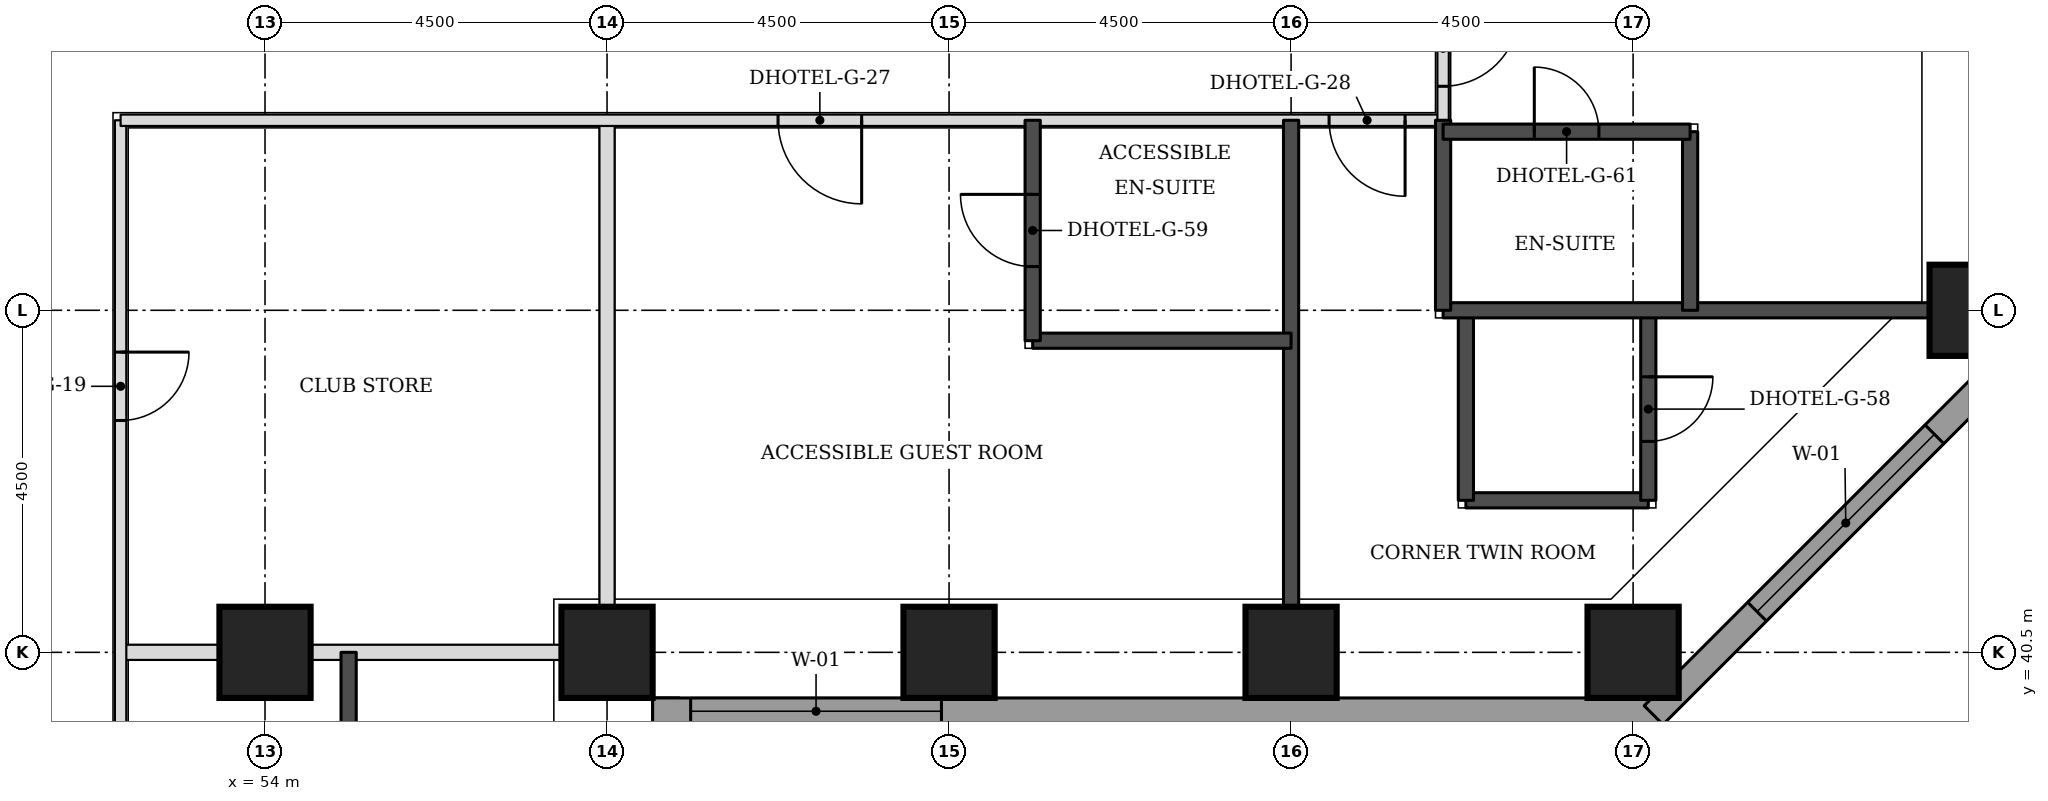
"""IFC4 building model, lengths in metres.
Left out: names, types, materials, properties, quantities, classifications, styles, units other than length and angle.
Written with IfcOpenShell. Run it as: python <this file> out.ifc"""

import sys

from ifc_helpers import new_model, si_unit, direction, frame, frame_2d, origin, origin_2d, place, context, subcontext, project, spatial, rectangle, extrude, element, fill, save


model = new_model("IFC4")
c1 = context("Model", 3, precision=1e-05, world=origin(), true_north=direction((0.0, 1.0)))
c2 = subcontext(c1, "Body", "Model", "MODEL_VIEW")
j1 = project(units=[si_unit("LENGTHUNIT", "METRE"), si_unit("PLANEANGLEUNIT", "RADIAN")], contexts=[c1])
p1 = place(None, origin())
s1 = spatial("IfcSite", under=j1, at=p1, CompositionType="ELEMENT")
p2 = place(p1, origin())
s2 = spatial("IfcBuilding", under=s1, at=p2, CompositionType="ELEMENT")
p3 = place(p2, frame((0.0, 0.0, 66.0)))
s3 = spatial("IfcBuildingStorey", under=s2, at=p3, CompositionType="ELEMENT", Elevation=66.0)
for number, where, z_axis, x_axis in (
    (1, (54.0, 40.5, 0.0), (0.0, 0.0, 1.0), (1.0, 0.0, 0.0)),
    (2, (58.5, 40.5, 0.0), (0.0, 0.0, 1.0), (1.0, 0.0, 0.0)),
    (3, (63.0, 40.5, 0.0), (0.0, 0.0, 1.0), (1.0, 0.0, 0.0)),
    (4, (67.5, 40.5, 0.0), (0.0, 0.0, 1.0), (1.0, 0.0, 0.0)),
    (5, (72.0, 40.5, 0.0), (0.0, 0.0, 1.0), (1.0, 0.0, 0.0)),
    (6, (76.5, 45.0, 0.0), (0.0, 0.0, 1.0), (1.0, 0.0, 0.0)),
):
    element("IfcColumn", number, at=place(p3, frame(where, z_axis=z_axis, x_axis=x_axis)), inside=s3, PredefinedType="COLUMN", context=c2, shape_type="SweptSolid", body=[
        extrude(rectangle(XDim=1.2, YDim=1.2, at=origin_2d()), origin(), (0.0, 0.0, 1.0), 3.3),
    ])
p4 = place(p3, frame((59.275, 22.106, 0.0), z_axis=(0.0, 0.0, 1.0), x_axis=(0.0, 1.0, 0.0)))
e7 = element("IfcWall", 7, at=p4, inside=s3, PredefinedType="STANDARD", context=c2, shape_type="SweptSolid", body=[
    extrude(rectangle(XDim=17.793, YDim=0.35, at=frame_2d((8.897, 0.0))), origin(), (0.0, 0.0, 1.0), 3.055),
])
p5 = place(p4, frame((5.493, 0.0, 0.8)))
e8 = element("IfcOpeningElement", 8, at=p5, cuts=e7, PredefinedType="OPENING", context=c2, shape_type="SweptSolid", body=[
    extrude(rectangle(XDim=3.3, YDim=1.5, at=frame_2d((1.65, 0.75))), frame((0.0, 0.185, 0.0), z_axis=(0.0, -1.0, 0.0), x_axis=(1.0, 0.0, 0.0)), (0.0, 0.0, 1.0), 0.37),
])
p6 = place(p4, frame((13.993, 0.0, 0.8)))
e9 = element("IfcOpeningElement", 9, at=p6, cuts=e7, PredefinedType="OPENING", context=c2, shape_type="SweptSolid", body=[
    extrude(rectangle(XDim=3.3, YDim=1.5, at=frame_2d((1.65, 0.75))), frame((0.0, 0.185, 0.0), z_axis=(0.0, -1.0, 0.0), x_axis=(1.0, 0.0, 0.0)), (0.0, 0.0, 1.0), 0.37),
])
p7 = place(p3, frame((59.1, 39.725, 0.0), z_axis=(0.0, 0.0, 1.0), x_axis=(1.0, 0.0, 0.0)))
e10 = element("IfcWall", 10, at=p7, inside=s3, PredefinedType="STANDARD", context=c2, shape_type="SweptSolid", body=[
    extrude(rectangle(XDim=13.293, YDim=0.35, at=frame_2d((6.647, 0.0))), origin(), (0.0, 0.0, 1.0), 3.055),
])
p8 = place(p7, frame((0.5, 0.0, 0.8)))
e11 = element("IfcOpeningElement", 11, at=p8, cuts=e10, PredefinedType="OPENING", context=c2, shape_type="SweptSolid", body=[
    extrude(rectangle(XDim=3.3, YDim=1.5, at=frame_2d((1.65, 0.75))), frame((0.0, 0.185, 0.0), z_axis=(0.0, -1.0, 0.0), x_axis=(1.0, 0.0, 0.0)), (0.0, 0.0, 1.0), 0.37),
])
p9 = place(p3, frame((72.27, 39.674, 0.0), z_axis=(0.0, 0.0, 1.0), x_axis=(0.707106781187, 0.707106781187, 0.0)))
e12 = element("IfcWall", 12, at=p9, inside=s3, PredefinedType="STANDARD", context=c2, shape_type="SweptSolid", body=[
    extrude(rectangle(XDim=7.151, YDim=0.35, at=frame_2d((3.576, 0.0))), origin(), (0.0, 0.0, 1.0), 3.055),
])
p10 = place(p9, frame((1.926, 0.0, 0.8)))
e13 = element("IfcOpeningElement", 13, at=p10, cuts=e12, PredefinedType="OPENING", context=c2, shape_type="SweptSolid", body=[
    extrude(rectangle(XDim=3.3, YDim=1.5, at=frame_2d((1.65, 0.75))), frame((0.0, 0.185, 0.0), z_axis=(0.0, -1.0, 0.0), x_axis=(1.0, 0.0, 0.0)), (0.0, 0.0, 1.0), 0.37),
])
p11 = place(p3, frame((52.1, 40.5, 0.0), z_axis=(0.0, 0.0, 1.0), x_axis=(1.0, 0.0, 0.0)))
e14 = element("IfcWall", 14, at=p11, inside=s3, PredefinedType="PARTITIONING", context=c2, shape_type="SweptSolid", body=[
    extrude(rectangle(XDim=5.8, YDim=0.2, at=frame_2d((2.9, 0.0))), origin(), (0.0, 0.0, 1.0), 2.33),
])
p12 = place(p3, frame((58.5, 41.1, 0.0), z_axis=(0.0, 0.0, 1.0), x_axis=(0.0, 1.0, 0.0)))
e15 = element("IfcWall", 15, at=p12, inside=s3, PredefinedType="PARTITIONING", context=c2, shape_type="SweptSolid", body=[
    extrude(rectangle(XDim=6.4, YDim=0.2, at=frame_2d((3.2, 0.0))), origin(), (0.0, 0.0, 1.0), 3.08),
])
p13 = place(p3, frame((52.1, 24.4, 0.0), z_axis=(0.0, 0.0, 1.0), x_axis=(0.0, 1.0, 0.0)))
e16 = element("IfcWall", 16, at=p13, inside=s3, PredefinedType="PARTITIONING", context=c2, shape_type="SweptSolid", body=[
    extrude(rectangle(XDim=23.1, YDim=0.15, at=frame_2d((11.55, 0.0))), origin(), (0.0, 0.0, 1.0), 3.08),
])
p14 = place(p13, frame((1.025, 0.0, 0.0)))
e17 = element("IfcOpeningElement", 17, at=p14, cuts=e16, PredefinedType="OPENING", context=c2, shape_type="SweptSolid", body=[
    extrude(rectangle(XDim=1.0, YDim=2.1, at=frame_2d((0.5, 1.05))), frame((0.0, 0.085, 0.0), z_axis=(0.0, -1.0, 0.0), x_axis=(1.0, 0.0, 0.0)), (0.0, 0.0, 1.0), 0.17),
])
p15 = place(p13, frame((3.425, 0.0, 0.0)))
e18 = element("IfcOpeningElement", 18, at=p15, cuts=e16, PredefinedType="OPENING", context=c2, shape_type="SweptSolid", body=[
    extrude(rectangle(XDim=1.0, YDim=2.1, at=frame_2d((0.5, 1.05))), frame((0.0, 0.085, 0.0), z_axis=(0.0, -1.0, 0.0), x_axis=(1.0, 0.0, 0.0)), (0.0, 0.0, 1.0), 0.17),
])
p16 = place(p13, frame((10.025, 0.0, 0.0)))
e19 = element("IfcOpeningElement", 19, at=p16, cuts=e16, PredefinedType="OPENING", context=c2, shape_type="SweptSolid", body=[
    extrude(rectangle(XDim=1.0, YDim=2.1, at=frame_2d((0.5, 1.05))), frame((0.0, 0.085, 0.0), z_axis=(0.0, -1.0, 0.0), x_axis=(1.0, 0.0, 0.0)), (0.0, 0.0, 1.0), 0.17),
])
p17 = place(p13, frame((12.425, 0.0, 0.0)))
e20 = element("IfcOpeningElement", 20, at=p17, cuts=e16, PredefinedType="OPENING", context=c2, shape_type="SweptSolid", body=[
    extrude(rectangle(XDim=1.0, YDim=2.1, at=frame_2d((0.5, 1.05))), frame((0.0, 0.085, 0.0), z_axis=(0.0, -1.0, 0.0), x_axis=(1.0, 0.0, 0.0)), (0.0, 0.0, 1.0), 0.17),
])
p18 = place(p13, frame((19.15, 0.0, 0.0)))
e21 = element("IfcOpeningElement", 21, at=p18, cuts=e16, PredefinedType="OPENING", context=c2, shape_type="SweptSolid", body=[
    extrude(rectangle(XDim=0.9, YDim=2.1, at=frame_2d((0.45, 1.05))), frame((0.0, 0.085, 0.0), z_axis=(0.0, -1.0, 0.0), x_axis=(1.0, 0.0, 0.0)), (0.0, 0.0, 1.0), 0.17),
])
p19 = place(p3, frame((52.1, 47.5, 0.0), z_axis=(0.0, 0.0, 1.0), x_axis=(1.0, 0.0, 0.0)))
e22 = element("IfcWall", 22, at=p19, inside=s3, PredefinedType="PARTITIONING", context=c2, shape_type="SweptSolid", body=[
    extrude(rectangle(XDim=17.4, YDim=0.15, at=frame_2d((8.7, 0.0))), origin(), (0.0, 0.0, 1.0), 3.08),
])
p20 = place(p19, frame((8.65, 0.0, 0.0)))
e23 = element("IfcOpeningElement", 23, at=p20, cuts=e22, PredefinedType="OPENING", context=c2, shape_type="SweptSolid", body=[
    extrude(rectangle(XDim=1.1, YDim=2.1, at=frame_2d((0.55, 1.05))), frame((0.0, 0.085, 0.0), z_axis=(0.0, -1.0, 0.0), x_axis=(1.0, 0.0, 0.0)), (0.0, 0.0, 1.0), 0.17),
])
p21 = place(p19, frame((15.9, 0.0, 0.0)))
e24 = element("IfcOpeningElement", 24, at=p21, cuts=e22, PredefinedType="OPENING", context=c2, shape_type="SweptSolid", body=[
    extrude(rectangle(XDim=1.0, YDim=2.1, at=frame_2d((0.5, 1.05))), frame((0.0, 0.085, 0.0), z_axis=(0.0, -1.0, 0.0), x_axis=(1.0, 0.0, 0.0)), (0.0, 0.0, 1.0), 0.17),
])
p22 = place(p3, frame((69.5, 47.5, 0.0), z_axis=(0.0, 0.0, 1.0), x_axis=(0.0, 1.0, 0.0)))
e25 = element("IfcWall", 25, at=p22, inside=s3, PredefinedType="PARTITIONING", context=c2, shape_type="SweptSolid", body=[
    extrude(rectangle(XDim=26.5, YDim=0.15, at=frame_2d((13.25, 0.0))), origin(), (0.0, 0.0, 1.0), 3.08),
])
p23 = place(p22, frame((25.053, 0.0, 0.0)))
e26 = element("IfcOpeningElement", 26, at=p23, cuts=e25, PredefinedType="OPENING", context=c2, shape_type="SweptSolid", body=[
    extrude(rectangle(XDim=1.0, YDim=2.1, at=frame_2d((0.5, 1.05))), frame((0.0, 0.085, 0.0), z_axis=(0.0, -1.0, 0.0), x_axis=(1.0, 0.0, 0.0)), (0.0, 0.0, 1.0), 0.17),
])
p24 = place(p22, frame((22.925, 0.0, 0.0)))
e27 = element("IfcOpeningElement", 27, at=p24, cuts=e25, PredefinedType="OPENING", context=c2, shape_type="SweptSolid", body=[
    extrude(rectangle(XDim=1.0, YDim=2.1, at=frame_2d((0.5, 1.05))), frame((0.0, 0.085, 0.0), z_axis=(0.0, -1.0, 0.0), x_axis=(1.0, 0.0, 0.0)), (0.0, 0.0, 1.0), 0.17),
])
p25 = place(p22, frame((16.325, 0.0, 0.0)))
e28 = element("IfcOpeningElement", 28, at=p25, cuts=e25, PredefinedType="OPENING", context=c2, shape_type="SweptSolid", body=[
    extrude(rectangle(XDim=1.0, YDim=2.1, at=frame_2d((0.5, 1.05))), frame((0.0, 0.085, 0.0), z_axis=(0.0, -1.0, 0.0), x_axis=(1.0, 0.0, 0.0)), (0.0, 0.0, 1.0), 0.17),
])
p26 = place(p22, frame((13.925, 0.0, 0.0)))
e29 = element("IfcOpeningElement", 29, at=p26, cuts=e25, PredefinedType="OPENING", context=c2, shape_type="SweptSolid", body=[
    extrude(rectangle(XDim=1.0, YDim=2.1, at=frame_2d((0.5, 1.05))), frame((0.0, 0.085, 0.0), z_axis=(0.0, -1.0, 0.0), x_axis=(1.0, 0.0, 0.0)), (0.0, 0.0, 1.0), 0.17),
])
p27 = place(p22, frame((4.25, 0.0, 0.0)))
e30 = element("IfcOpeningElement", 30, at=p27, cuts=e25, PredefinedType="OPENING", context=c2, shape_type="SweptSolid", body=[
    extrude(rectangle(XDim=1.1, YDim=2.1, at=frame_2d((0.55, 1.05))), frame((0.0, 0.085, 0.0), z_axis=(0.0, -1.0, 0.0), x_axis=(1.0, 0.0, 0.0)), (0.0, 0.0, 1.0), 0.17),
])
p28 = place(p22, frame((0.447, 0.0, 0.0)))
e31 = element("IfcOpeningElement", 31, at=p28, cuts=e25, PredefinedType="OPENING", context=c2, shape_type="SweptSolid", body=[
    extrude(rectangle(XDim=1.0, YDim=2.1, at=frame_2d((0.5, 1.05))), frame((0.0, 0.085, 0.0), z_axis=(0.0, -1.0, 0.0), x_axis=(1.0, 0.0, 0.0)), (0.0, 0.0, 1.0), 0.17),
])
p29 = place(p3, frame((55.1, 38.65, 0.0), z_axis=(0.0, 0.0, 1.0), x_axis=(0.0, 1.0, 0.0)))
e32 = element("IfcWall", 32, at=p29, inside=s3, PredefinedType="SOLIDWALL", context=c2, shape_type="SweptSolid", body=[
    extrude(rectangle(XDim=1.85, YDim=0.2, at=frame_2d((0.925, 0.0))), origin(), (0.0, 0.0, 1.0), 3.08),
])
p30 = place(p3, frame((67.5, 41.1, 0.0), z_axis=(0.0, 0.0, 1.0), x_axis=(0.0, 1.0, 0.0)))
e33 = element("IfcWall", 33, at=p30, inside=s3, PredefinedType="SOLIDWALL", context=c2, shape_type="SweptSolid", body=[
    extrude(rectangle(XDim=6.4, YDim=0.2, at=frame_2d((3.2, 0.0))), origin(), (0.0, 0.0, 1.0), 3.08),
])
p31 = place(p3, frame((69.8, 42.5, 0.0), z_axis=(0.0, 0.0, 1.0), x_axis=(1.0, 0.0, 0.0)))
e34 = element("IfcWall", 34, at=p31, inside=s3, PredefinedType="SOLIDWALL", context=c2, shape_type="SweptSolid", body=[
    extrude(rectangle(XDim=2.4, YDim=0.2, at=frame_2d((1.2, 0.0))), origin(), (0.0, 0.0, 1.0), 3.08),
])
p32 = place(p3, frame((69.8, 42.5, 0.0), z_axis=(0.0, 0.0, 1.0), x_axis=(0.0, 1.0, 0.0)))
e35 = element("IfcWall", 35, at=p32, inside=s3, PredefinedType="SOLIDWALL", context=c2, shape_type="SweptSolid", body=[
    extrude(rectangle(XDim=2.5, YDim=0.2, at=frame_2d((1.25, 0.0))), origin(), (0.0, 0.0, 1.0), 3.08),
])
p33 = place(p3, frame((72.2, 42.5, 0.0), z_axis=(0.0, 0.0, 1.0), x_axis=(0.0, 1.0, 0.0)))
e36 = element("IfcWall", 36, at=p33, inside=s3, PredefinedType="SOLIDWALL", context=c2, shape_type="SweptSolid", body=[
    extrude(rectangle(XDim=2.5, YDim=0.2, at=frame_2d((1.25, 0.0))), origin(), (0.0, 0.0, 1.0), 3.08),
])
p34 = place(p33, frame((0.775, 0.0, 0.0)))
e37 = element("IfcOpeningElement", 37, at=p34, cuts=e36, PredefinedType="OPENING", context=c2, shape_type="SweptSolid", body=[
    extrude(rectangle(XDim=0.85, YDim=2.1, at=frame_2d((0.425, 1.05))), frame((0.0, 0.11, 0.0), z_axis=(0.0, -1.0, 0.0), x_axis=(1.0, 0.0, 0.0)), (0.0, 0.0, 1.0), 0.22),
])
p35 = place(p3, frame((64.1, 44.6, 0.0), z_axis=(0.0, 0.0, 1.0), x_axis=(1.0, 0.0, 0.0)))
e38 = element("IfcWall", 38, at=p35, inside=s3, PredefinedType="SOLIDWALL", context=c2, shape_type="SweptSolid", body=[
    extrude(rectangle(XDim=3.4, YDim=0.2, at=frame_2d((1.7, 0.0))), origin(), (0.0, 0.0, 1.0), 3.08),
])
p36 = place(p3, frame((64.1, 44.6, 0.0), z_axis=(0.0, 0.0, 1.0), x_axis=(0.0, 1.0, 0.0)))
e39 = element("IfcWall", 39, at=p36, inside=s3, PredefinedType="SOLIDWALL", context=c2, shape_type="SweptSolid", body=[
    extrude(rectangle(XDim=2.9, YDim=0.2, at=frame_2d((1.45, 0.0))), origin(), (0.0, 0.0, 1.0), 3.08),
])
p37 = place(p36, frame((0.975, 0.0, 0.0)))
e40 = element("IfcOpeningElement", 40, at=p37, cuts=e39, PredefinedType="OPENING", context=c2, shape_type="SweptSolid", body=[
    extrude(rectangle(XDim=0.95, YDim=2.1, at=frame_2d((0.475, 1.05))), frame((0.0, 0.11, 0.0), z_axis=(0.0, -1.0, 0.0), x_axis=(1.0, 0.0, 0.0)), (0.0, 0.0, 1.0), 0.22),
])
p38 = place(p3, frame((69.5, 45.0, 0.0), z_axis=(0.0, 0.0, 1.0), x_axis=(1.0, 0.0, 0.0)))
e41 = element("IfcWall", 41, at=p38, inside=s3, PredefinedType="SOLIDWALL", context=c2, shape_type="SweptSolid", body=[
    extrude(rectangle(XDim=6.4, YDim=0.2, at=frame_2d((3.2, 0.0))), origin(), (0.0, 0.0, 1.0), 3.08),
])
p39 = place(p3, frame((69.5, 45.0, 0.0), z_axis=(0.0, 0.0, 1.0), x_axis=(0.0, 1.0, 0.0)))
e42 = element("IfcWall", 42, at=p39, inside=s3, PredefinedType="SOLIDWALL", context=c2, shape_type="SweptSolid", body=[
    extrude(rectangle(XDim=2.5, YDim=0.2, at=frame_2d((1.25, 0.0))), origin(), (0.0, 0.0, 1.0), 3.08),
])
p40 = place(p3, frame((72.75, 45.0, 0.0), z_axis=(0.0, 0.0, 1.0), x_axis=(0.0, 1.0, 0.0)))
e43 = element("IfcWall", 43, at=p40, inside=s3, PredefinedType="SOLIDWALL", context=c2, shape_type="SweptSolid", body=[
    extrude(rectangle(XDim=2.35, YDim=0.2, at=frame_2d((1.175, 0.0))), origin(), (0.0, 0.0, 1.0), 3.08),
])
p41 = place(p3, frame((69.5, 47.35, 0.0), z_axis=(0.0, 0.0, 1.0), x_axis=(1.0, 0.0, 0.0)))
e44 = element("IfcWall", 44, at=p41, inside=s3, PredefinedType="SOLIDWALL", context=c2, shape_type="SweptSolid", body=[
    extrude(rectangle(XDim=3.25, YDim=0.2, at=frame_2d((1.625, 0.0))), origin(), (0.0, 0.0, 1.0), 3.08),
])
p42 = place(p41, frame((1.2, 0.0, 0.0)))
e45 = element("IfcOpeningElement", 45, at=p42, cuts=e44, PredefinedType="OPENING", context=c2, shape_type="SweptSolid", body=[
    extrude(rectangle(XDim=0.85, YDim=2.1, at=frame_2d((0.425, 1.05))), frame((0.0, 0.11, 0.0), z_axis=(0.0, -1.0, 0.0), x_axis=(1.0, 0.0, 0.0)), (0.0, 0.0, 1.0), 0.22),
])
p43 = place(p8, origin())
e46 = element("IfcWindow", 46, at=p43, inside=s3, PartitioningType="SINGLE_PANEL", PredefinedType="WINDOW", context=c2, shape_type="SweptSolid", body=[
    extrude(rectangle(XDim=3.3, YDim=1.5, at=frame_2d((1.65, 0.75))), frame((0.0, 0.085, 0.0), z_axis=(0.0, -1.0, 0.0), x_axis=(1.0, 0.0, 0.0)), (0.0, 0.0, 1.0), 0.06),
])
fill(e11, e46)
p44 = place(p10, origin())
e47 = element("IfcWindow", 47, at=p44, inside=s3, PartitioningType="SINGLE_PANEL", PredefinedType="WINDOW", context=c2, shape_type="SweptSolid", body=[
    extrude(rectangle(XDim=3.3, YDim=1.5, at=frame_2d((1.65, 0.75))), frame((0.0, 0.085, 0.0), z_axis=(0.0, -1.0, 0.0), x_axis=(1.0, 0.0, 0.0)), (0.0, 0.0, 1.0), 0.06),
])
fill(e13, e47)
p45 = place(p28, frame((1.0, 0.0, 0.0), z_axis=(0.0, 0.0, 1.0), x_axis=(-1.0, 0.0, 0.0)))
e48 = element("IfcDoor", 48, at=p45, inside=s3, OperationType="SINGLE_SWING_LEFT", PredefinedType="DOOR", context=c2, shape_type="SweptSolid", body=[
    extrude(rectangle(XDim=1.0, YDim=2.1, at=frame_2d((0.5, 1.05))), frame((0.0, 0.025, 0.0), z_axis=(0.0, -1.0, 0.0), x_axis=(1.0, 0.0, 0.0)), (0.0, 0.0, 1.0), 0.05),
])
fill(e31, e48)
p46 = place(p42, origin())
e49 = element("IfcDoor", 49, at=p46, inside=s3, OperationType="SINGLE_SWING_LEFT", PredefinedType="DOOR", context=c2, shape_type="SweptSolid", body=[
    extrude(rectangle(XDim=0.85, YDim=2.1, at=frame_2d((0.425, 1.05))), frame((0.0, 0.025, 0.0), z_axis=(0.0, -1.0, 0.0), x_axis=(1.0, 0.0, 0.0)), (0.0, 0.0, 1.0), 0.05),
])
fill(e45, e49)
p47 = place(p20, frame((1.1, 0.0, 0.0), z_axis=(0.0, 0.0, 1.0), x_axis=(-1.0, 0.0, 0.0)))
e50 = element("IfcDoor", 50, at=p47, inside=s3, OperationType="SINGLE_SWING_LEFT", PredefinedType="DOOR", context=c2, shape_type="SweptSolid", body=[
    extrude(rectangle(XDim=1.1, YDim=2.1, at=frame_2d((0.55, 1.05))), frame((0.0, 0.025, 0.0), z_axis=(0.0, -1.0, 0.0), x_axis=(1.0, 0.0, 0.0)), (0.0, 0.0, 1.0), 0.05),
])
fill(e23, e50)
p48 = place(p37, origin())
e51 = element("IfcDoor", 51, at=p48, inside=s3, OperationType="SINGLE_SWING_RIGHT", PredefinedType="DOOR", context=c2, shape_type="SweptSolid", body=[
    extrude(rectangle(XDim=0.95, YDim=2.1, at=frame_2d((0.475, 1.05))), frame((0.0, 0.025, 0.0), z_axis=(0.0, -1.0, 0.0), x_axis=(1.0, 0.0, 0.0)), (0.0, 0.0, 1.0), 0.05),
])
fill(e40, e51)
p49 = place(p21, frame((1.0, 0.0, 0.0), z_axis=(0.0, 0.0, 1.0), x_axis=(-1.0, 0.0, 0.0)))
e52 = element("IfcDoor", 52, at=p49, inside=s3, OperationType="SINGLE_SWING_LEFT", PredefinedType="DOOR", context=c2, shape_type="SweptSolid", body=[
    extrude(rectangle(XDim=1.0, YDim=2.1, at=frame_2d((0.5, 1.05))), frame((0.0, 0.025, 0.0), z_axis=(0.0, -1.0, 0.0), x_axis=(1.0, 0.0, 0.0)), (0.0, 0.0, 1.0), 0.05),
])
fill(e24, e52)
p50 = place(p34, frame((0.85, 0.0, 0.0), z_axis=(0.0, 0.0, 1.0), x_axis=(-1.0, 0.0, 0.0)))
e53 = element("IfcDoor", 53, at=p50, inside=s3, OperationType="SINGLE_SWING_LEFT", PredefinedType="DOOR", context=c2, shape_type="SweptSolid", body=[
    extrude(rectangle(XDim=0.85, YDim=2.1, at=frame_2d((0.425, 1.05))), frame((0.0, 0.025, 0.0), z_axis=(0.0, -1.0, 0.0), x_axis=(1.0, 0.0, 0.0)), (0.0, 0.0, 1.0), 0.05),
])
fill(e37, e53)
p51 = place(p18, frame((0.9, 0.0, 0.0), z_axis=(0.0, 0.0, 1.0), x_axis=(-1.0, 0.0, 0.0)))
e54 = element("IfcDoor", 54, at=p51, inside=s3, OperationType="SINGLE_SWING_LEFT", PredefinedType="DOOR", context=c2, shape_type="SweptSolid", body=[
    extrude(rectangle(XDim=0.9, YDim=2.1, at=frame_2d((0.45, 1.05))), frame((0.0, 0.025, 0.0), z_axis=(0.0, -1.0, 0.0), x_axis=(1.0, 0.0, 0.0)), (0.0, 0.0, 1.0), 0.05),
])
fill(e21, e54)
save(model, sys.argv[1])
